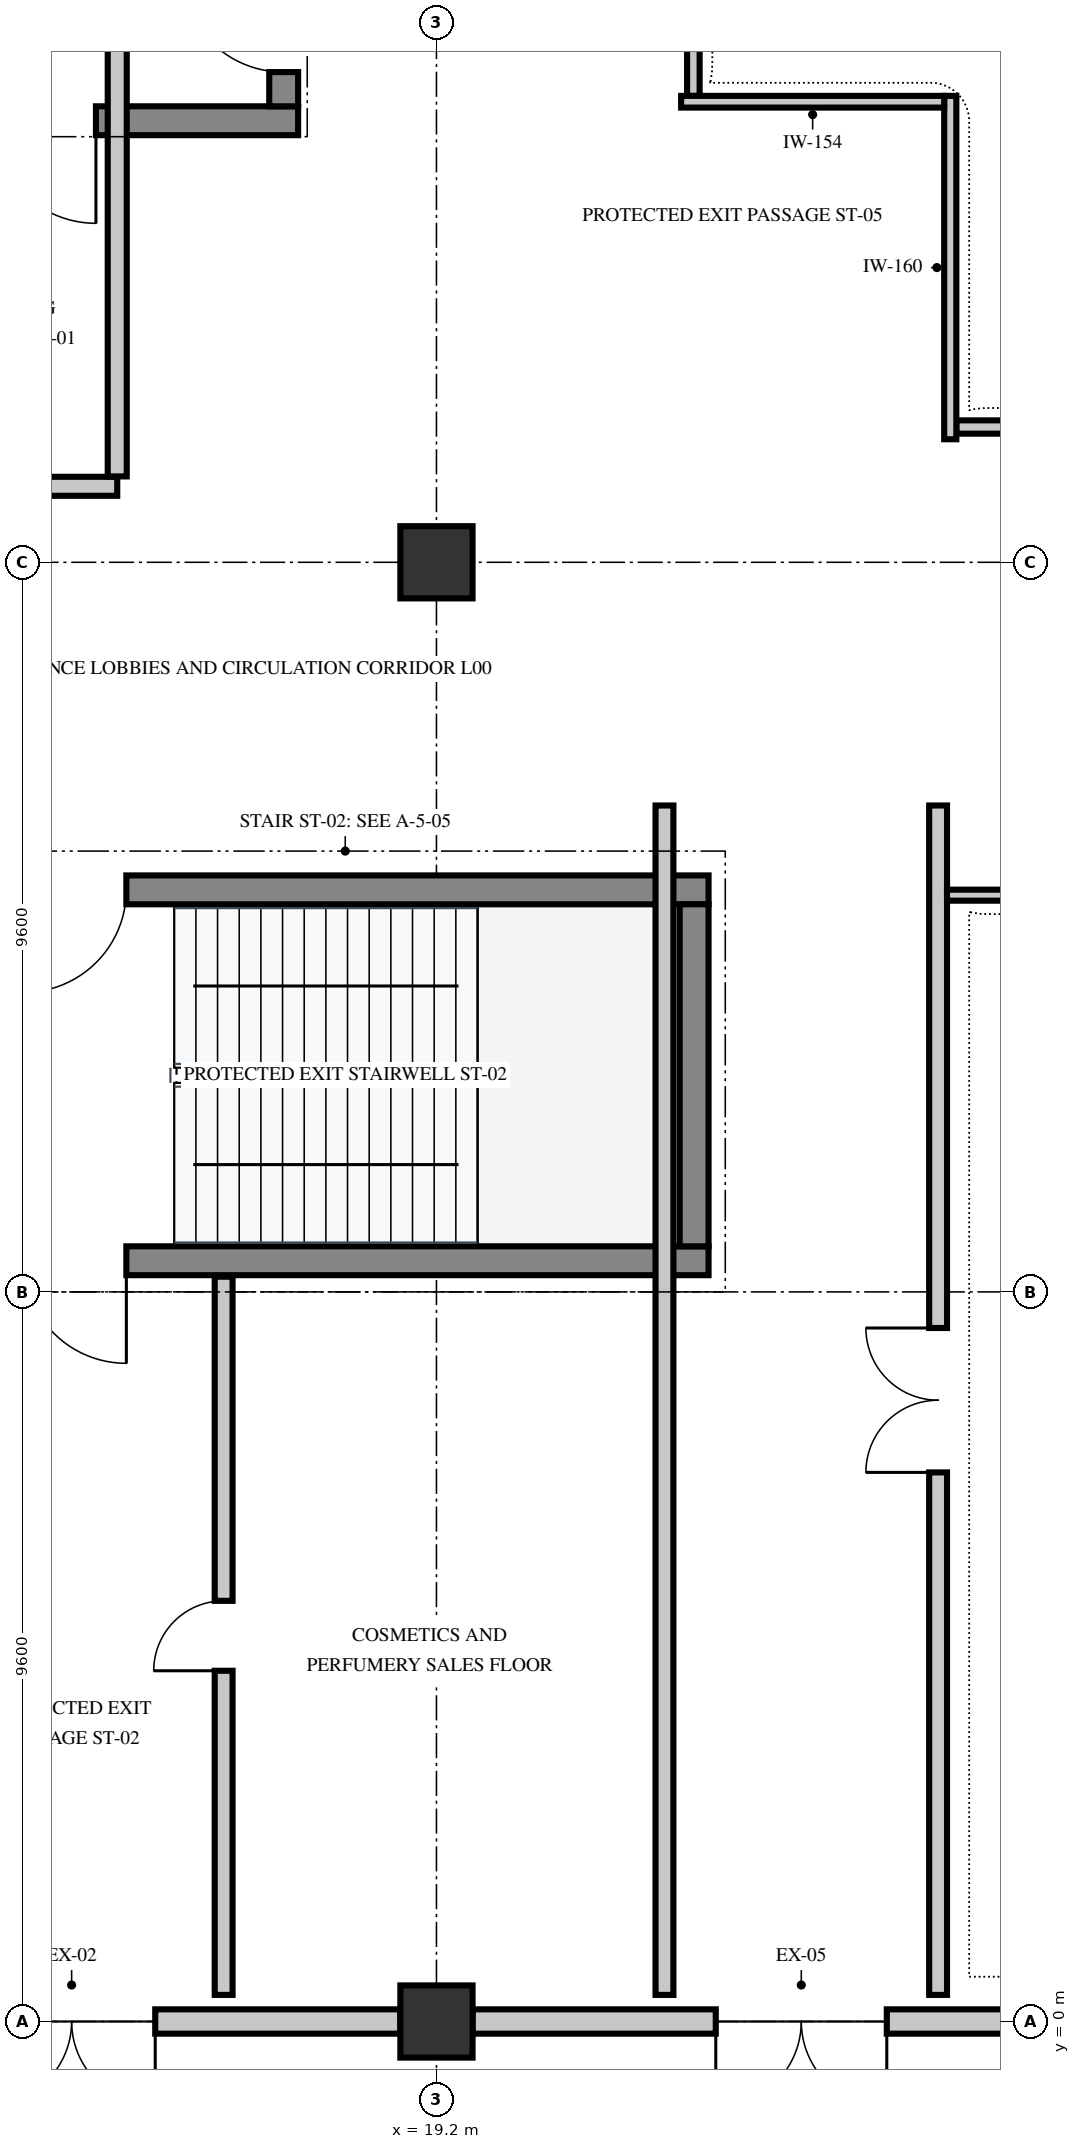
"""IFC4 building model, lengths in metres.
Left out: names, types, materials, properties, quantities, classifications, styles, units other than length and angle.
Written with IfcOpenShell. Run it as: python <this file> out.ifc"""

import sys

from ifc_helpers import new_model, si_unit, direction, frame, frame_2d, origin, origin_2d, place, context, subcontext, project, spatial, rectangle, extrude, element, fill, save


model = new_model("IFC4")
c1 = context("Model", 3, precision=1e-05, world=origin(), true_north=direction((0.0, 1.0)))
c2 = subcontext(c1, "Body", "Model", "MODEL_VIEW")
j1 = project(units=[si_unit("LENGTHUNIT", "METRE"), si_unit("PLANEANGLEUNIT", "RADIAN")], contexts=[c1])
p1 = place(None, origin())
s1 = spatial("IfcSite", under=j1, at=p1, CompositionType="ELEMENT")
p2 = place(p1, origin())
s2 = spatial("IfcBuilding", under=s1, at=p2, CompositionType="ELEMENT")
p3 = place(p2, origin())
s3 = spatial("IfcBuildingStorey", under=s2, at=p3, CompositionType="ELEMENT", Elevation=0.0)
for number, where, z_axis, x_axis in (
    (1, (19.2, 0.0, 0.0), (0.0, 0.0, 1.0), (1.0, 0.0, 0.0)),
    (2, (19.2, 19.2, 0.0), (0.0, 0.0, 1.0), (1.0, 0.0, 0.0)),
):
    element("IfcColumn", number, at=place(p3, frame(where, z_axis=z_axis, x_axis=x_axis)), inside=s3, PredefinedType="COLUMN", context=c2, shape_type="SweptSolid", body=[
        extrude(rectangle(XDim=0.95, YDim=0.95, at=origin_2d()), origin(), (0.0, 0.0, 1.0), 5.4),
    ])
p4 = place(p3, frame((28.325, 0.0, 0.0), z_axis=(0.0, 0.0, 1.0), x_axis=(-1.0, 0.0, 0.0)))
e3 = element("IfcWall", 3, at=p4, inside=s3, PredefinedType="SOLIDWALL", context=c2, shape_type="SweptSolid", body=[
    extrude(rectangle(XDim=8.65, YDim=0.32, at=frame_2d((4.325, 0.0))), origin(), (0.0, 0.0, 1.0), 5.09),
])
p5 = place(p4, frame((3.2, 0.0, 0.0)))
e4 = element("IfcOpeningElement", 4, at=p5, cuts=e3, PredefinedType="OPENING", context=c2, shape_type="SweptSolid", body=[
    extrude(rectangle(XDim=2.25, YDim=2.35, at=frame_2d((1.125, 1.175))), frame((0.0, 0.172, 0.0), z_axis=(0.0, -1.0, 0.0), x_axis=(1.0, 0.0, 0.0)), (0.0, 0.0, 1.0), 0.344),
])
p6 = place(p3, frame((18.725, 0.0, 0.0), z_axis=(0.0, 0.0, 1.0), x_axis=(-1.0, 0.0, 0.0)))
e5 = element("IfcWall", 5, at=p6, inside=s3, PredefinedType="SOLIDWALL", context=c2, shape_type="SweptSolid", body=[
    extrude(rectangle(XDim=8.65, YDim=0.32, at=frame_2d((4.325, 0.0))), origin(), (0.0, 0.0, 1.0), 5.09),
])
p7 = place(p6, frame((3.225, 0.0, 0.0)))
e6 = element("IfcOpeningElement", 6, at=p7, cuts=e5, PredefinedType="OPENING", context=c2, shape_type="SweptSolid", body=[
    extrude(rectangle(XDim=2.2, YDim=2.3, at=frame_2d((1.1, 1.15))), frame((0.0, 0.172, 0.0), z_axis=(0.0, -1.0, 0.0), x_axis=(1.0, 0.0, 0.0)), (0.0, 0.0, 1.0), 0.344),
])
p8 = place(p3, frame((13.22, 10.01, 0.0), z_axis=(0.0, 0.0, 1.0), x_axis=(1.0, 0.0, 0.0)))
e7 = element("IfcWall", 7, at=p8, inside=s3, PredefinedType="SHEAR", context=c2, shape_type="SweptSolid", body=[
    extrude(rectangle(XDim=9.56, YDim=0.38, at=frame_2d((4.78, 0.0))), origin(), (0.0, 0.0, 1.0), 5.09),
])
p9 = place(p8, frame((0.55, 0.0, 0.0)))
e8 = element("IfcOpeningElement", 8, at=p9, cuts=e7, PredefinedType="OPENING", context=c2, shape_type="SweptSolid", body=[
    extrude(rectangle(XDim=1.35, YDim=2.2, at=frame_2d((0.675, 1.1))), frame((0.0, 0.202, 0.0), z_axis=(0.0, -1.0, 0.0), x_axis=(1.0, 0.0, 0.0)), (0.0, 0.0, 1.0), 0.404),
])
p10 = place(p3, frame((13.22, 14.89, 0.0), z_axis=(0.0, 0.0, 1.0), x_axis=(1.0, 0.0, 0.0)))
e9 = element("IfcWall", 9, at=p10, inside=s3, PredefinedType="SHEAR", context=c2, shape_type="SweptSolid", body=[
    extrude(rectangle(XDim=9.56, YDim=0.38, at=frame_2d((4.78, 0.0))), origin(), (0.0, 0.0, 1.0), 5.09),
])
p11 = place(p10, frame((0.55, 0.0, 0.0)))
e10 = element("IfcOpeningElement", 10, at=p11, cuts=e9, PredefinedType="OPENING", context=c2, shape_type="SweptSolid", body=[
    extrude(rectangle(XDim=1.35, YDim=2.2, at=frame_2d((0.675, 1.1))), frame((0.0, 0.202, 0.0), z_axis=(0.0, -1.0, 0.0), x_axis=(1.0, 0.0, 0.0)), (0.0, 0.0, 1.0), 0.404),
])
p12 = place(p3, frame((22.59, 10.2, 0.0), z_axis=(0.0, 0.0, 1.0), x_axis=(0.0, 1.0, 0.0)))
e11 = element("IfcWall", 11, at=p12, inside=s3, PredefinedType="SHEAR", context=c2, shape_type="SweptSolid", body=[
    extrude(rectangle(XDim=4.5, YDim=0.38, at=frame_2d((2.25, 0.0))), origin(), (0.0, 0.0, 1.0), 5.09),
])
p13 = place(p3, frame((12.12, 25.01, 0.0), z_axis=(0.0, 0.0, 1.0), x_axis=(1.0, 0.0, 0.0)))
e12 = element("IfcWall", 12, at=p13, inside=s3, PredefinedType="SHEAR", context=c2, shape_type="SweptSolid", body=[
    extrude(rectangle(XDim=5.26, YDim=0.38, at=frame_2d((2.63, 0.0))), origin(), (0.0, 0.0, 1.0), 5.09),
])
p14 = place(p13, frame((1.25, 0.0, 0.0)))
e13 = element("IfcOpeningElement", 13, at=p14, cuts=e12, PredefinedType="OPENING", context=c2, shape_type="SweptSolid", body=[
    extrude(rectangle(XDim=1.35, YDim=2.2, at=frame_2d((0.675, 1.1))), frame((0.0, 0.202, 0.0), z_axis=(0.0, -1.0, 0.0), x_axis=(1.0, 0.0, 0.0)), (0.0, 0.0, 1.0), 0.404),
])
p15 = place(p3, frame((17.19, 25.2, 0.0), z_axis=(0.0, 0.0, 1.0), x_axis=(0.0, 1.0, 0.0)))
e14 = element("IfcWall", 14, at=p15, inside=s3, PredefinedType="SHEAR", context=c2, shape_type="SweptSolid", body=[
    extrude(rectangle(XDim=8.8, YDim=0.38, at=frame_2d((4.4, 0.0))), origin(), (0.0, 0.0, 1.0), 5.09),
])
p16 = place(p15, frame((0.45, 0.0, 0.0)))
e15 = element("IfcOpeningElement", 15, at=p16, cuts=e14, PredefinedType="OPENING", context=c2, shape_type="SweptSolid", body=[
    extrude(rectangle(XDim=1.35, YDim=2.2, at=frame_2d((0.675, 1.1))), frame((0.0, 0.202, 0.0), z_axis=(0.0, -1.0, 0.0), x_axis=(1.0, 0.0, 0.0)), (0.0, 0.0, 1.0), 0.404),
])
p17 = place(p3, frame((11.2, 20.2, 0.0), z_axis=(0.0, 0.0, 1.0), x_axis=(1.0, 0.0, 0.0)))
e16 = element("IfcWall", 16, at=p17, inside=s3, PredefinedType="PARTITIONING", context=c2, shape_type="SweptSolid", body=[
    extrude(rectangle(XDim=3.8, YDim=0.25, at=frame_2d((1.9, 0.0))), origin(), (0.0, 0.0, 1.0), 5.09),
])
p18 = place(p17, frame((1.0, 0.0, 0.0)))
e17 = element("IfcOpeningElement", 17, at=p18, cuts=e16, PredefinedType="OPENING", context=c2, shape_type="SweptSolid", body=[
    extrude(rectangle(XDim=1.8, YDim=2.25, at=frame_2d((0.9, 1.125))), frame((0.0, 0.137, 0.0), z_axis=(0.0, -1.0, 0.0), x_axis=(1.0, 0.0, 0.0)), (0.0, 0.0, 1.0), 0.274),
])
p19 = place(p3, frame((15.0, 20.33, 0.0), z_axis=(0.0, 0.0, 1.0), x_axis=(0.0, 1.0, 0.0)))
e18 = element("IfcWall", 18, at=p19, inside=s3, PredefinedType="PARTITIONING", context=c2, shape_type="SweptSolid", body=[
    extrude(rectangle(XDim=7.14, YDim=0.25, at=frame_2d((3.57, 0.0))), origin(), (0.0, 0.0, 1.0), 5.09),
])
p20 = place(p3, frame((16.4, 0.35, 0.0), z_axis=(0.0, 0.0, 1.0), x_axis=(0.0, 1.0, 0.0)))
e19 = element("IfcWall", 19, at=p20, inside=s3, PredefinedType="PARTITIONING", context=c2, shape_type="SweptSolid", body=[
    extrude(rectangle(XDim=9.45, YDim=0.235, at=frame_2d((4.725, 0.0))), origin(), (0.0, 0.0, 1.0), 5.09),
])
p21 = place(p20, frame((4.265, 0.0, 0.0)))
e20 = element("IfcOpeningElement", 20, at=p21, cuts=e19, PredefinedType="OPENING", context=c2, shape_type="SweptSolid", body=[
    extrude(rectangle(XDim=0.92, YDim=2.1, at=frame_2d((0.46, 1.05))), frame((0.0, 0.129, 0.0), z_axis=(0.0, -1.0, 0.0), x_axis=(1.0, 0.0, 0.0)), (0.0, 0.0, 1.0), 0.259),
])
p22 = place(p3, frame((22.2, 0.35, 0.0), z_axis=(0.0, 0.0, 1.0), x_axis=(0.0, 1.0, 0.0)))
e21 = element("IfcWall", 21, at=p22, inside=s3, PredefinedType="PARTITIONING", context=c2, shape_type="SweptSolid", body=[
    extrude(rectangle(XDim=15.65, YDim=0.235, at=frame_2d((7.825, 0.0))), origin(), (0.0, 0.0, 1.0), 5.09),
])
p23 = place(p3, frame((25.8, 0.35, 0.0), z_axis=(0.0, 0.0, 1.0), x_axis=(0.0, 1.0, 0.0)))
e22 = element("IfcWall", 22, at=p23, inside=s3, PredefinedType="PARTITIONING", context=c2, shape_type="SweptSolid", body=[
    extrude(rectangle(XDim=15.65, YDim=0.235, at=frame_2d((7.825, 0.0))), origin(), (0.0, 0.0, 1.0), 5.09),
])
p24 = place(p23, frame((6.875, 0.0, 0.0)))
e23 = element("IfcOpeningElement", 23, at=p24, cuts=e22, PredefinedType="OPENING", context=c2, shape_type="SweptSolid", body=[
    extrude(rectangle(XDim=1.9, YDim=2.25, at=frame_2d((0.95, 1.125))), frame((0.0, 0.129, 0.0), z_axis=(0.0, -1.0, 0.0), x_axis=(1.0, 0.0, 0.0)), (0.0, 0.0, 1.0), 0.259),
])
p25 = place(p3, frame((44.22, 20.98, 0.0), z_axis=(0.0, 0.0, 1.0), x_axis=(-1.0, 0.0, 0.0)))
e24 = element("IfcWall", 24, at=p25, inside=s3, PredefinedType="PARTITIONING", context=c2, shape_type="SweptSolid", body=[
    extrude(rectangle(XDim=18.18, YDim=0.175, at=frame_2d((9.09, 0.0))), origin(), (0.0, 0.0, 1.0), 5.09),
])
p26 = place(p3, frame((22.58, 25.337, 0.0), z_axis=(0.0, 0.0, 1.0), x_axis=(0.0, 1.0, 0.0)))
e25 = element("IfcWall", 25, at=p26, inside=s3, PredefinedType="PARTITIONING", context=c2, shape_type="SweptSolid", body=[
    extrude(rectangle(XDim=9.183, YDim=0.165, at=frame_2d((4.592, 0.0))), origin(), (0.0, 0.0, 1.0), 5.09),
])
p27 = place(p3, frame((25.96, 20.819, 0.0), z_axis=(0.0, 0.0, 1.0), x_axis=(0.0, 1.0, 0.0)))
e26 = element("IfcWall", 26, at=p27, inside=s3, PredefinedType="PARTITIONING", context=c2, shape_type="SweptSolid", body=[
    extrude(rectangle(XDim=4.518, YDim=0.16, at=frame_2d((2.259, 0.0))), origin(), (0.0, 0.0, 1.0), 5.09),
])
p28 = place(p3, frame((25.88, 25.26, 0.0), z_axis=(0.0, 0.0, 1.0), x_axis=(-1.0, 0.0, 0.0)))
e27 = element("IfcWall", 27, at=p28, inside=s3, PredefinedType="PARTITIONING", context=c2, shape_type="SweptSolid", body=[
    extrude(rectangle(XDim=3.461, YDim=0.154, at=frame_2d((1.73, 0.0))), origin(), (0.0, 0.0, 1.0), 5.09),
])
p29 = place(p3, frame((25.917, 14.82, 0.0), z_axis=(0.0, 0.0, 1.0), x_axis=(1.0, 0.0, 0.0)))
e28 = element("IfcWall", 28, at=p29, inside=s3, PredefinedType="PARTITIONING", context=c2, shape_type="SweptSolid", body=[
    extrude(rectangle(XDim=12.363, YDim=0.145, at=frame_2d((6.181, 0.0))), origin(), (0.0, 0.0, 1.0), 4.03),
])
p30 = place(p29, frame((5.992, 0.0, 0.0)))
e29 = element("IfcOpeningElement", 29, at=p30, cuts=e28, PredefinedType="OPENING", context=c2, shape_type="SweptSolid", body=[
    extrude(rectangle(XDim=0.92, YDim=2.1, at=frame_2d((0.46, 1.05))), frame((0.0, 0.084, 0.0), z_axis=(0.0, -1.0, 0.0), x_axis=(1.0, 0.0, 0.0)), (0.0, 0.0, 1.0), 0.169),
])
p31 = place(p5, origin())
e30 = element("IfcDoor", 30, at=p31, inside=s3, OperationType="DOUBLE_DOOR_SINGLE_SWING", PredefinedType="DOOR", context=c2, shape_type="SweptSolid", body=[
    extrude(rectangle(XDim=2.25, YDim=2.35, at=frame_2d((1.125, 1.175))), frame((0.0, 0.025, 0.0), z_axis=(0.0, -1.0, 0.0), x_axis=(1.0, 0.0, 0.0)), (0.0, 0.0, 1.0), 0.05),
])
fill(e4, e30)
p32 = place(p7, origin())
e31 = element("IfcDoor", 31, at=p32, inside=s3, OperationType="DOUBLE_DOOR_SINGLE_SWING", PredefinedType="DOOR", context=c2, shape_type="SweptSolid", body=[
    extrude(rectangle(XDim=2.2, YDim=2.3, at=frame_2d((1.1, 1.15))), frame((0.0, 0.025, 0.0), z_axis=(0.0, -1.0, 0.0), x_axis=(1.0, 0.0, 0.0)), (0.0, 0.0, 1.0), 0.05),
])
fill(e6, e31)
p33 = place(p11, frame((1.35, 0.0, 0.0), z_axis=(0.0, 0.0, 1.0), x_axis=(-1.0, 0.0, 0.0)))
e32 = element("IfcDoor", 32, at=p33, inside=s3, OperationType="SINGLE_SWING_RIGHT", PredefinedType="DOOR", context=c2, shape_type="SweptSolid", body=[
    extrude(rectangle(XDim=1.35, YDim=2.2, at=frame_2d((0.675, 1.1))), frame((0.0, 0.025, 0.0), z_axis=(0.0, -1.0, 0.0), x_axis=(1.0, 0.0, 0.0)), (0.0, 0.0, 1.0), 0.05),
])
fill(e10, e32)
p34 = place(p9, frame((1.35, 0.0, 0.0), z_axis=(0.0, 0.0, 1.0), x_axis=(-1.0, 0.0, 0.0)))
e33 = element("IfcDoor", 33, at=p34, inside=s3, OperationType="SINGLE_SWING_LEFT", PredefinedType="DOOR", context=c2, shape_type="SweptSolid", body=[
    extrude(rectangle(XDim=1.35, YDim=2.2, at=frame_2d((0.675, 1.1))), frame((0.0, 0.025, 0.0), z_axis=(0.0, -1.0, 0.0), x_axis=(1.0, 0.0, 0.0)), (0.0, 0.0, 1.0), 0.05),
])
fill(e8, e33)
p35 = place(p16, origin())
e34 = element("IfcDoor", 34, at=p35, inside=s3, OperationType="SINGLE_SWING_RIGHT", PredefinedType="DOOR", context=c2, shape_type="SweptSolid", body=[
    extrude(rectangle(XDim=1.35, YDim=2.2, at=frame_2d((0.675, 1.1))), frame((0.0, 0.025, 0.0), z_axis=(0.0, -1.0, 0.0), x_axis=(1.0, 0.0, 0.0)), (0.0, 0.0, 1.0), 0.05),
])
fill(e15, e34)
p36 = place(p14, frame((1.35, 0.0, 0.0), z_axis=(0.0, 0.0, 1.0), x_axis=(-1.0, 0.0, 0.0)))
e35 = element("IfcDoor", 35, at=p36, inside=s3, OperationType="SINGLE_SWING_LEFT", PredefinedType="DOOR", context=c2, shape_type="SweptSolid", body=[
    extrude(rectangle(XDim=1.35, YDim=2.2, at=frame_2d((0.675, 1.1))), frame((0.0, 0.025, 0.0), z_axis=(0.0, -1.0, 0.0), x_axis=(1.0, 0.0, 0.0)), (0.0, 0.0, 1.0), 0.05),
])
fill(e13, e35)
p37 = place(p24, origin())
e36 = element("IfcDoor", 36, at=p37, inside=s3, OperationType="DOUBLE_DOOR_SINGLE_SWING", PredefinedType="DOOR", context=c2, shape_type="SweptSolid", body=[
    extrude(rectangle(XDim=1.9, YDim=2.25, at=frame_2d((0.95, 1.125))), frame((0.0, 0.025, 0.0), z_axis=(0.0, -1.0, 0.0), x_axis=(1.0, 0.0, 0.0)), (0.0, 0.0, 1.0), 0.05),
])
fill(e23, e36)
p38 = place(p21, origin())
e37 = element("IfcDoor", 37, at=p38, inside=s3, OperationType="SINGLE_SWING_LEFT", PredefinedType="DOOR", context=c2, shape_type="SweptSolid", body=[
    extrude(rectangle(XDim=0.92, YDim=2.1, at=frame_2d((0.46, 1.05))), frame((0.0, 0.025, 0.0), z_axis=(0.0, -1.0, 0.0), x_axis=(1.0, 0.0, 0.0)), (0.0, 0.0, 1.0), 0.05),
])
fill(e20, e37)
save(model, sys.argv[1])
